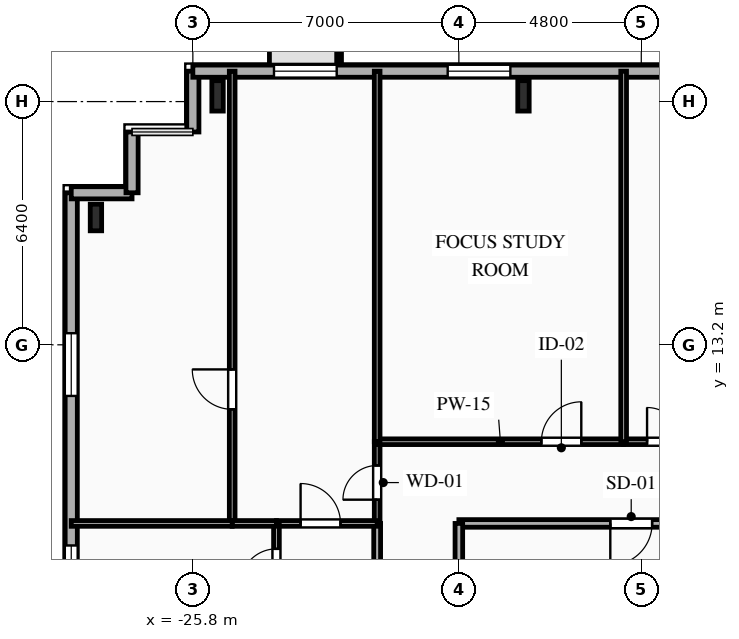
"""IFC4 building model, lengths in metres.
Left out: names, types, materials, properties, quantities, classifications, styles, units other than length and angle.
Written with IfcOpenShell. Run it as: python <this file> out.ifc"""

import sys

from ifc_helpers import new_model, si_unit, direction, frame, frame_2d, origin, origin_2d, place, context, subcontext, project, spatial, rectangle, i_section, extrude, element, fill, save


model = new_model("IFC4")
c1 = context("Model", 3, precision=1e-05, world=origin(), true_north=direction((0.0, 1.0)))
c2 = subcontext(c1, "Body", "Model", "MODEL_VIEW")
j1 = project(units=[si_unit("LENGTHUNIT", "METRE"), si_unit("PLANEANGLEUNIT", "RADIAN")], contexts=[c1])
p1 = place(None, origin())
s1 = spatial("IfcSite", under=j1, at=p1, CompositionType="ELEMENT")
p2 = place(p1, origin())
s2 = spatial("IfcBuilding", under=s1, at=p2, CompositionType="ELEMENT")
p3 = place(p2, frame((0.0, 0.0, 141.05)))
s3 = spatial("IfcBuildingStorey", under=s2, at=p3, CompositionType="ELEMENT", Elevation=141.05)
for number, where, z_axis, x_axis in (
    (1, (-17.1, 19.75, 0.0), (0.0, 0.0, 1.0), (1.0, 0.0, 0.0)),
    (2, (-25.15, 19.75, 0.0), (0.0, 0.0, 1.0), (1.0, 0.0, 0.0)),
):
    element("IfcColumn", number, at=place(p3, frame(where, z_axis=z_axis, x_axis=x_axis)), inside=s3, PredefinedType="COLUMN", context=c2, shape_type="SweptSolid", body=[
        extrude(i_section(OverallWidth=0.3, OverallDepth=0.8, WebThickness=0.018, FlangeThickness=0.033, FilletRadius=0.03, at=origin_2d()), origin(), (0.0, 0.0, 1.0), 3.35),
    ])
p4 = place(p3, frame((-28.35, 16.55, 0.0), z_axis=(0.0, 0.0, 1.0), x_axis=(1.0, 0.0, 0.0)))
e3 = element("IfcColumn", 3, at=p4, inside=s3, PredefinedType="COLUMN", context=c2, shape_type="SweptSolid", body=[
    extrude(i_section(OverallWidth=0.3, OverallDepth=0.7, WebThickness=0.017, FlangeThickness=0.032, FilletRadius=0.027, at=origin_2d()), origin(), (0.0, 0.0, 1.0), 3.35),
])
p5 = place(p3, frame((-29.0, -12.4, 0.0), z_axis=(0.0, 0.0, 1.0), x_axis=(0.0, 1.0, 0.0)))
e4 = element("IfcWall", 4, at=p5, inside=s3, PredefinedType="SOLIDWALL", context=c2, shape_type="SweptSolid", body=[
    extrude(rectangle(XDim=29.6, YDim=0.32, at=frame_2d((14.8, 0.0))), origin(), (0.0, 0.0, 1.0), 3.04),
])
p6 = place(p5, frame((2.855, 0.0, 0.85)))
e5 = element("IfcOpeningElement", 5, at=p6, cuts=e4, PredefinedType="OPENING", context=c2, shape_type="SweptSolid", body=[
    extrude(rectangle(XDim=1.65, YDim=1.85, at=frame_2d((0.825, 0.925))), frame((0.0, 0.17, 0.0), z_axis=(0.0, -1.0, 0.0), x_axis=(1.0, 0.0, 0.0)), (0.0, 0.0, 1.0), 0.34),
])
p7 = place(p5, frame((9.865, 0.0, 0.85)))
e6 = element("IfcOpeningElement", 6, at=p7, cuts=e4, PredefinedType="OPENING", context=c2, shape_type="SweptSolid", body=[
    extrude(rectangle(XDim=1.95, YDim=1.85, at=frame_2d((0.975, 0.925))), frame((0.0, 0.17, 0.0), z_axis=(0.0, -1.0, 0.0), x_axis=(1.0, 0.0, 0.0)), (0.0, 0.0, 1.0), 0.34),
])
p8 = place(p5, frame((13.08, 0.0, 0.85)))
e7 = element("IfcOpeningElement", 7, at=p8, cuts=e4, PredefinedType="OPENING", context=c2, shape_type="SweptSolid", body=[
    extrude(rectangle(XDim=1.6, YDim=1.85, at=frame_2d((0.8, 0.925))), frame((0.0, 0.17, 0.0), z_axis=(0.0, -1.0, 0.0), x_axis=(1.0, 0.0, 0.0)), (0.0, 0.0, 1.0), 0.34),
])
p9 = place(p5, frame((15.88, 0.0, 0.85)))
e8 = element("IfcOpeningElement", 8, at=p9, cuts=e4, PredefinedType="OPENING", context=c2, shape_type="SweptSolid", body=[
    extrude(rectangle(XDim=1.6, YDim=1.85, at=frame_2d((0.8, 0.925))), frame((0.0, 0.17, 0.0), z_axis=(0.0, -1.0, 0.0), x_axis=(1.0, 0.0, 0.0)), (0.0, 0.0, 1.0), 0.34),
])
p10 = place(p5, frame((18.72, 0.0, 0.85)))
e9 = element("IfcOpeningElement", 9, at=p10, cuts=e4, PredefinedType="OPENING", context=c2, shape_type="SweptSolid", body=[
    extrude(rectangle(XDim=1.6, YDim=1.85, at=frame_2d((0.8, 0.925))), frame((0.0, 0.17, 0.0), z_axis=(0.0, -1.0, 0.0), x_axis=(1.0, 0.0, 0.0)), (0.0, 0.0, 1.0), 0.34),
])
p11 = place(p5, frame((24.255, 0.0, 0.85)))
e10 = element("IfcOpeningElement", 10, at=p11, cuts=e4, PredefinedType="OPENING", context=c2, shape_type="SweptSolid", body=[
    extrude(rectangle(XDim=1.65, YDim=1.85, at=frame_2d((0.825, 0.925))), frame((0.0, 0.17, 0.0), z_axis=(0.0, -1.0, 0.0), x_axis=(1.0, 0.0, 0.0)), (0.0, 0.0, 1.0), 0.34),
])
for number, where, z_axis, x_axis in (
    (11, (-29.0, 17.2, 0.0), (0.0, 0.0, 1.0), (1.0, 0.0, 0.0)),
    (12, (-27.4, 17.2, 0.0), (0.0, 0.0, 1.0), (0.0, 1.0, 0.0)),
):
    element("IfcWall", number, at=place(p3, frame(where, z_axis=z_axis, x_axis=x_axis)), inside=s3, PredefinedType="SOLIDWALL", context=c2, shape_type="SweptSolid", body=[
        extrude(rectangle(XDim=1.6, YDim=0.32, at=frame_2d((0.8, 0.0))), origin(), (0.0, 0.0, 1.0), 3.04),
    ])
p12 = place(p3, frame((-25.8, 18.8, 0.0), z_axis=(0.0, 0.0, 1.0), x_axis=(0.0, 1.0, 0.0)))
e13 = element("IfcWall", 13, at=p12, inside=s3, PredefinedType="SOLIDWALL", context=c2, shape_type="SweptSolid", body=[
    extrude(rectangle(XDim=1.6, YDim=0.32, at=frame_2d((0.8, 0.0))), origin(), (0.0, 0.0, 1.0), 3.04),
])
p13 = place(p3, frame((-25.8, 20.4, 0.0), z_axis=(0.0, 0.0, 1.0), x_axis=(1.0, 0.0, 0.0)))
e14 = element("IfcWall", 14, at=p13, inside=s3, PredefinedType="SOLIDWALL", context=c2, shape_type="SweptSolid", body=[
    extrude(rectangle(XDim=49.6, YDim=0.32, at=frame_2d((24.8, 0.0))), origin(), (0.0, 0.0, 1.0), 3.04),
])
p14 = place(p13, frame((2.135, 0.0, 0.85)))
e15 = element("IfcOpeningElement", 15, at=p14, cuts=e14, PredefinedType="OPENING", context=c2, shape_type="SweptSolid", body=[
    extrude(rectangle(XDim=1.65, YDim=1.85, at=frame_2d((0.825, 0.925))), frame((0.0, 0.17, 0.0), z_axis=(0.0, -1.0, 0.0), x_axis=(1.0, 0.0, 0.0)), (0.0, 0.0, 1.0), 0.34),
])
p15 = place(p13, frame((6.706, 0.0, 0.85)))
e16 = element("IfcOpeningElement", 16, at=p15, cuts=e14, PredefinedType="OPENING", context=c2, shape_type="SweptSolid", body=[
    extrude(rectangle(XDim=1.65, YDim=1.85, at=frame_2d((0.825, 0.925))), frame((0.0, 0.17, 0.0), z_axis=(0.0, -1.0, 0.0), x_axis=(1.0, 0.0, 0.0)), (0.0, 0.0, 1.0), 0.34),
])
p16 = place(p13, frame((14.76, 0.0, 0.85)))
e17 = element("IfcOpeningElement", 17, at=p16, cuts=e14, PredefinedType="OPENING", context=c2, shape_type="SweptSolid", body=[
    extrude(rectangle(XDim=1.6, YDim=1.85, at=frame_2d((0.8, 0.925))), frame((0.0, 0.17, 0.0), z_axis=(0.0, -1.0, 0.0), x_axis=(1.0, 0.0, 0.0)), (0.0, 0.0, 1.0), 0.34),
])
p17 = place(p13, frame((19.26, 0.0, 0.85)))
e18 = element("IfcOpeningElement", 18, at=p17, cuts=e14, PredefinedType="OPENING", context=c2, shape_type="SweptSolid", body=[
    extrude(rectangle(XDim=2.2, YDim=1.85, at=frame_2d((1.1, 0.925))), frame((0.0, 0.17, 0.0), z_axis=(0.0, -1.0, 0.0), x_axis=(1.0, 0.0, 0.0)), (0.0, 0.0, 1.0), 0.34),
])
p18 = place(p13, frame((25.26, 0.0, 0.85)))
e19 = element("IfcOpeningElement", 19, at=p18, cuts=e14, PredefinedType="OPENING", context=c2, shape_type="SweptSolid", body=[
    extrude(rectangle(XDim=2.2, YDim=1.85, at=frame_2d((1.1, 0.925))), frame((0.0, 0.17, 0.0), z_axis=(0.0, -1.0, 0.0), x_axis=(1.0, 0.0, 0.0)), (0.0, 0.0, 1.0), 0.34),
])
p19 = place(p13, frame((30.4, 0.0, 0.85)))
e20 = element("IfcOpeningElement", 20, at=p19, cuts=e14, PredefinedType="OPENING", context=c2, shape_type="SweptSolid", body=[
    extrude(rectangle(XDim=2.2, YDim=1.85, at=frame_2d((1.1, 0.925))), frame((0.0, 0.17, 0.0), z_axis=(0.0, -1.0, 0.0), x_axis=(1.0, 0.0, 0.0)), (0.0, 0.0, 1.0), 0.34),
])
p20 = place(p13, frame((37.18, 0.0, 0.85)))
e21 = element("IfcOpeningElement", 21, at=p20, cuts=e14, PredefinedType="OPENING", context=c2, shape_type="SweptSolid", body=[
    extrude(rectangle(XDim=2.2, YDim=1.85, at=frame_2d((1.1, 0.925))), frame((0.0, 0.17, 0.0), z_axis=(0.0, -1.0, 0.0), x_axis=(1.0, 0.0, 0.0)), (0.0, 0.0, 1.0), 0.34),
])
p21 = place(p13, frame((43.215, 0.0, 0.85)))
e22 = element("IfcOpeningElement", 22, at=p21, cuts=e14, PredefinedType="OPENING", context=c2, shape_type="SweptSolid", body=[
    extrude(rectangle(XDim=1.65, YDim=1.85, at=frame_2d((0.825, 0.925))), frame((0.0, 0.17, 0.0), z_axis=(0.0, -1.0, 0.0), x_axis=(1.0, 0.0, 0.0)), (0.0, 0.0, 1.0), 0.34),
])
p22 = place(p13, frame((47.45, 0.0, 0.85)))
e23 = element("IfcOpeningElement", 23, at=p22, cuts=e14, PredefinedType="OPENING", context=c2, shape_type="SweptSolid", body=[
    extrude(rectangle(XDim=1.1, YDim=1.85, at=frame_2d((0.55, 0.925))), frame((0.0, 0.17, 0.0), z_axis=(0.0, -1.0, 0.0), x_axis=(1.0, 0.0, 0.0)), (0.0, 0.0, 1.0), 0.34),
])
p23 = place(p3, frame((-12.0, 8.5, 0.0), z_axis=(0.0, 0.0, 1.0), x_axis=(-1.0, 0.0, 0.0)))
e24 = element("IfcWall", 24, at=p23, inside=s3, PredefinedType="PARTITIONING", context=c2, shape_type="SweptSolid", body=[
    extrude(rectangle(XDim=6.8, YDim=0.2, at=frame_2d((3.4, 0.0))), origin(), (0.0, 0.0, 1.0), 3.04),
])
p24 = place(p23, frame((1.715, 0.0, 0.0)))
e25 = element("IfcOpeningElement", 25, at=p24, cuts=e24, PredefinedType="OPENING", context=c2, shape_type="SweptSolid", body=[
    extrude(rectangle(XDim=1.1, YDim=2.15, at=frame_2d((0.55, 1.075))), frame((0.0, 0.11, 0.0), z_axis=(0.0, -1.0, 0.0), x_axis=(1.0, 0.0, 0.0)), (0.0, 0.0, 1.0), 0.22),
])
p25 = place(p3, frame((-18.8, 8.5, 0.0), z_axis=(0.0, 0.0, 1.0), x_axis=(0.0, -1.0, 0.0)))
e26 = element("IfcWall", 26, at=p25, inside=s3, PredefinedType="PARTITIONING", context=c2, shape_type="SweptSolid", body=[
    extrude(rectangle(XDim=2.9, YDim=0.2, at=frame_2d((1.45, 0.0))), origin(), (0.0, 0.0, 1.0), 2.525),
])
p26 = place(p3, frame((-20.95, 8.5, 0.0), z_axis=(0.0, 0.0, 1.0), x_axis=(0.0, 1.0, 0.0)))
e27 = element("IfcWall", 27, at=p26, inside=s3, PredefinedType="PARTITIONING", context=c2, shape_type="SweptSolid", body=[
    extrude(rectangle(XDim=2.15, YDim=0.15, at=frame_2d((1.075, 0.0))), origin(), (0.0, 0.0, 1.0), 3.04),
])
p27 = place(p26, frame((0.625, 0.0, 0.0)))
e28 = element("IfcOpeningElement", 28, at=p27, cuts=e27, PredefinedType="OPENING", context=c2, shape_type="SweptSolid", body=[
    extrude(rectangle(XDim=0.9, YDim=2.1, at=frame_2d((0.45, 1.05))), frame((0.0, 0.085, 0.0), z_axis=(0.0, -1.0, 0.0), x_axis=(1.0, 0.0, 0.0)), (0.0, 0.0, 1.0), 0.17),
])
p28 = place(p3, frame((-20.95, 10.65, 0.0), z_axis=(0.0, 0.0, 1.0), x_axis=(1.0, 0.0, 0.0)))
e29 = element("IfcWall", 29, at=p28, inside=s3, PredefinedType="PARTITIONING", context=c2, shape_type="SweptSolid", body=[
    extrude(rectangle(XDim=6.486, YDim=0.15, at=frame_2d((3.243, 0.0))), origin(), (0.0, 0.0, 1.0), 3.04),
])
p29 = place(p28, frame((4.322, 0.0, 0.0)))
e30 = element("IfcOpeningElement", 30, at=p29, cuts=e29, PredefinedType="OPENING", context=c2, shape_type="SweptSolid", body=[
    extrude(rectangle(XDim=1.05, YDim=2.15, at=frame_2d((0.525, 1.075))), frame((0.0, 0.085, 0.0), z_axis=(0.0, -1.0, 0.0), x_axis=(1.0, 0.0, 0.0)), (0.0, 0.0, 1.0), 0.17),
])
p30 = place(p3, frame((-14.464, 10.65, 0.0), z_axis=(0.0, 0.0, 1.0), x_axis=(1.0, 0.0, 0.0)))
e31 = element("IfcWall", 31, at=p30, inside=s3, PredefinedType="PLUMBINGWALL", context=c2, shape_type="SweptSolid", body=[
    extrude(rectangle(XDim=2.35, YDim=0.15, at=frame_2d((1.175, 0.0))), origin(), (0.0, 0.0, 1.0), 3.04),
])
p31 = place(p30, frame((0.616, 0.0, 0.0)))
e32 = element("IfcOpeningElement", 32, at=p31, cuts=e31, PredefinedType="OPENING", context=c2, shape_type="SweptSolid", body=[
    extrude(rectangle(XDim=0.9, YDim=2.1, at=frame_2d((0.45, 1.05))), frame((0.0, 0.085, 0.0), z_axis=(0.0, -1.0, 0.0), x_axis=(1.0, 0.0, 0.0)), (0.0, 0.0, 1.0), 0.17),
])
p32 = place(p3, frame((-20.95, -5.6, 0.0), z_axis=(0.0, 0.0, 1.0), x_axis=(0.0, 1.0, 0.0)))
e33 = element("IfcWall", 33, at=p32, inside=s3, PredefinedType="PARTITIONING", context=c2, shape_type="SweptSolid", body=[
    extrude(rectangle(XDim=14.1, YDim=0.18, at=frame_2d((7.05, 0.0))), origin(), (0.0, 0.0, 1.0), 3.04),
])
p33 = place(p32, frame((5.058, 0.0, 0.0)))
e34 = element("IfcOpeningElement", 34, at=p33, cuts=e33, PredefinedType="OPENING", context=c2, shape_type="SweptSolid", body=[
    extrude(rectangle(XDim=1.0, YDim=2.15, at=frame_2d((0.5, 1.075))), frame((0.0, 0.1, 0.0), z_axis=(0.0, -1.0, 0.0), x_axis=(1.0, 0.0, 0.0)), (0.0, 0.0, 1.0), 0.2),
])
p34 = place(p3, frame((-23.6, 8.5, 0.0), z_axis=(0.0, 0.0, 1.0), x_axis=(1.0, 0.0, 0.0)))
e35 = element("IfcWall", 35, at=p34, inside=s3, PredefinedType="PARTITIONING", context=c2, shape_type="SweptSolid", body=[
    extrude(rectangle(XDim=2.65, YDim=0.15, at=frame_2d((1.325, 0.0))), origin(), (0.0, 0.0, 1.0), 3.04),
])
p35 = place(p34, frame((0.635, 0.0, 0.0)))
e36 = element("IfcOpeningElement", 36, at=p35, cuts=e35, PredefinedType="OPENING", context=c2, shape_type="SweptSolid", body=[
    extrude(rectangle(XDim=1.05, YDim=2.15, at=frame_2d((0.525, 1.075))), frame((0.0, 0.085, 0.0), z_axis=(0.0, -1.0, 0.0), x_axis=(1.0, 0.0, 0.0)), (0.0, 0.0, 1.0), 0.17),
])
p36 = place(p3, frame((-23.6, 5.68, 0.0), z_axis=(0.0, 0.0, 1.0), x_axis=(0.0, 1.0, 0.0)))
e37 = element("IfcWall", 37, at=p36, inside=s3, PredefinedType="PARTITIONING", context=c2, shape_type="SweptSolid", body=[
    extrude(rectangle(XDim=2.82, YDim=0.15, at=frame_2d((1.41, 0.0))), origin(), (0.0, 0.0, 1.0), 2.695),
])
p37 = place(p36, frame((1.201, 0.0, 0.0)))
e38 = element("IfcOpeningElement", 38, at=p37, cuts=e37, PredefinedType="OPENING", context=c2, shape_type="SweptSolid", body=[
    extrude(rectangle(XDim=0.95, YDim=2.1, at=frame_2d((0.475, 1.05))), frame((0.0, 0.085, 0.0), z_axis=(0.0, -1.0, 0.0), x_axis=(1.0, 0.0, 0.0)), (0.0, 0.0, 1.0), 0.17),
])
p38 = place(p3, frame((-24.765, 8.5, 0.0), z_axis=(0.0, 0.0, 1.0), x_axis=(0.0, 1.0, 0.0)))
e39 = element("IfcWall", 39, at=p38, inside=s3, PredefinedType="PARTITIONING", context=c2, shape_type="SweptSolid", body=[
    extrude(rectangle(XDim=11.9, YDim=0.15, at=frame_2d((5.95, 0.0))), origin(), (0.0, 0.0, 1.0), 3.04),
])
p39 = place(p38, frame((3.002, 0.0, 0.0)))
e40 = element("IfcOpeningElement", 40, at=p39, cuts=e39, PredefinedType="OPENING", context=c2, shape_type="SweptSolid", body=[
    extrude(rectangle(XDim=1.05, YDim=2.15, at=frame_2d((0.525, 1.075))), frame((0.0, 0.085, 0.0), z_axis=(0.0, -1.0, 0.0), x_axis=(1.0, 0.0, 0.0)), (0.0, 0.0, 1.0), 0.17),
])
p40 = place(p3, frame((-23.6, 8.5, 0.0), z_axis=(0.0, 0.0, 1.0), x_axis=(-1.0, 0.0, 0.0)))
e41 = element("IfcWall", 41, at=p40, inside=s3, PredefinedType="PARTITIONING", context=c2, shape_type="SweptSolid", body=[
    extrude(rectangle(XDim=1.165, YDim=0.15, at=frame_2d((0.583, 0.0))), origin(), (0.0, 0.0, 1.0), 3.04),
])
p41 = place(p3, frame((-20.95, 20.4, 0.0), z_axis=(0.0, 0.0, 1.0), x_axis=(0.0, -1.0, 0.0)))
e42 = element("IfcWall", 42, at=p41, inside=s3, PredefinedType="PARTITIONING", context=c2, shape_type="SweptSolid", body=[
    extrude(rectangle(XDim=9.75, YDim=0.15, at=frame_2d((4.875, 0.0))), origin(), (0.0, 0.0, 1.0), 3.04),
])
p42 = place(p3, frame((-24.765, 8.5, 0.0), z_axis=(0.0, 0.0, 1.0), x_axis=(-1.0, 0.0, 0.0)))
e43 = element("IfcWall", 43, at=p42, inside=s3, PredefinedType="PARTITIONING", context=c2, shape_type="SweptSolid", body=[
    extrude(rectangle(XDim=4.235, YDim=0.15, at=frame_2d((2.118, 0.0))), origin(), (0.0, 0.0, 1.0), 3.04),
])
p43 = place(p3, frame((-14.464, 20.4, 0.0), z_axis=(0.0, 0.0, 1.0), x_axis=(0.0, -1.0, 0.0)))
e44 = element("IfcWall", 44, at=p43, inside=s3, PredefinedType="PLUMBINGWALL", context=c2, shape_type="SweptSolid", body=[
    extrude(rectangle(XDim=9.75, YDim=0.15, at=frame_2d((4.875, 0.0))), origin(), (0.0, 0.0, 1.0), 3.04),
])
p44 = place(p10, origin())
e45 = element("IfcWindow", 45, at=p44, inside=s3, PartitioningType="SINGLE_PANEL", PredefinedType="WINDOW", context=c2, shape_type="SweptSolid", body=[
    extrude(rectangle(XDim=1.6, YDim=1.85, at=frame_2d((0.8, 0.925))), frame((0.0, 0.03, 0.0), z_axis=(0.0, -1.0, 0.0), x_axis=(1.0, 0.0, 0.0)), (0.0, 0.0, 1.0), 0.06),
])
fill(e9, e45)
p45 = place(p11, origin())
e46 = element("IfcWindow", 46, at=p45, inside=s3, PartitioningType="SINGLE_PANEL", PredefinedType="WINDOW", context=c2, shape_type="SweptSolid", body=[
    extrude(rectangle(XDim=1.65, YDim=1.85, at=frame_2d((0.825, 0.925))), frame((0.0, 0.03, 0.0), z_axis=(0.0, -1.0, 0.0), x_axis=(1.0, 0.0, 0.0)), (0.0, 0.0, 1.0), 0.06),
])
fill(e10, e46)
p46 = place(p14, origin())
e47 = element("IfcWindow", 47, at=p46, inside=s3, PartitioningType="SINGLE_PANEL", PredefinedType="WINDOW", context=c2, shape_type="SweptSolid", body=[
    extrude(rectangle(XDim=1.65, YDim=1.85, at=frame_2d((0.825, 0.925))), frame((0.0, 0.03, 0.0), z_axis=(0.0, -1.0, 0.0), x_axis=(1.0, 0.0, 0.0)), (0.0, 0.0, 1.0), 0.06),
])
fill(e15, e47)
p47 = place(p15, origin())
e48 = element("IfcWindow", 48, at=p47, inside=s3, PartitioningType="SINGLE_PANEL", PredefinedType="WINDOW", context=c2, shape_type="SweptSolid", body=[
    extrude(rectangle(XDim=1.65, YDim=1.85, at=frame_2d((0.825, 0.925))), frame((0.0, 0.03, 0.0), z_axis=(0.0, -1.0, 0.0), x_axis=(1.0, 0.0, 0.0)), (0.0, 0.0, 1.0), 0.06),
])
fill(e16, e48)
p48 = place(p24, origin())
e49 = element("IfcDoor", 49, at=p48, inside=s3, OperationType="SINGLE_SWING_RIGHT", PredefinedType="DOOR", context=c2, shape_type="SweptSolid", body=[
    extrude(rectangle(XDim=1.1, YDim=2.15, at=frame_2d((0.55, 1.075))), frame((0.0, 0.025, 0.0), z_axis=(0.0, -1.0, 0.0), x_axis=(1.0, 0.0, 0.0)), (0.0, 0.0, 1.0), 0.05),
])
fill(e25, e49)
p49 = place(p27, origin())
e50 = element("IfcDoor", 50, at=p49, inside=s3, OperationType="SINGLE_SWING_LEFT", PredefinedType="DOOR", context=c2, shape_type="SweptSolid", body=[
    extrude(rectangle(XDim=0.9, YDim=2.1, at=frame_2d((0.45, 1.05))), frame((0.0, 0.025, 0.0), z_axis=(0.0, -1.0, 0.0), x_axis=(1.0, 0.0, 0.0)), (0.0, 0.0, 1.0), 0.05),
])
fill(e28, e50)
p50 = place(p29, origin())
e51 = element("IfcDoor", 51, at=p50, inside=s3, OperationType="SINGLE_SWING_RIGHT", PredefinedType="DOOR", context=c2, shape_type="SweptSolid", body=[
    extrude(rectangle(XDim=1.05, YDim=2.15, at=frame_2d((0.525, 1.075))), frame((0.0, 0.025, 0.0), z_axis=(0.0, -1.0, 0.0), x_axis=(1.0, 0.0, 0.0)), (0.0, 0.0, 1.0), 0.05),
])
fill(e30, e51)
p51 = place(p31, origin())
e52 = element("IfcDoor", 52, at=p51, inside=s3, OperationType="SINGLE_SWING_LEFT", PredefinedType="DOOR", context=c2, shape_type="SweptSolid", body=[
    extrude(rectangle(XDim=0.9, YDim=2.1, at=frame_2d((0.45, 1.05))), frame((0.0, 0.025, 0.0), z_axis=(0.0, -1.0, 0.0), x_axis=(1.0, 0.0, 0.0)), (0.0, 0.0, 1.0), 0.05),
])
fill(e32, e52)
p52 = place(p35, origin())
e53 = element("IfcDoor", 53, at=p52, inside=s3, OperationType="SINGLE_SWING_LEFT", PredefinedType="DOOR", context=c2, shape_type="SweptSolid", body=[
    extrude(rectangle(XDim=1.05, YDim=2.15, at=frame_2d((0.525, 1.075))), frame((0.0, 0.025, 0.0), z_axis=(0.0, -1.0, 0.0), x_axis=(1.0, 0.0, 0.0)), (0.0, 0.0, 1.0), 0.05),
])
fill(e36, e53)
p53 = place(p37, origin())
e54 = element("IfcDoor", 54, at=p53, inside=s3, OperationType="SINGLE_SWING_LEFT", PredefinedType="DOOR", context=c2, shape_type="SweptSolid", body=[
    extrude(rectangle(XDim=0.95, YDim=2.1, at=frame_2d((0.475, 1.05))), frame((0.0, 0.025, 0.0), z_axis=(0.0, -1.0, 0.0), x_axis=(1.0, 0.0, 0.0)), (0.0, 0.0, 1.0), 0.05),
])
fill(e38, e54)
p54 = place(p39, origin())
e55 = element("IfcDoor", 55, at=p54, inside=s3, OperationType="SINGLE_SWING_RIGHT", PredefinedType="DOOR", context=c2, shape_type="SweptSolid", body=[
    extrude(rectangle(XDim=1.05, YDim=2.15, at=frame_2d((0.525, 1.075))), frame((0.0, 0.025, 0.0), z_axis=(0.0, -1.0, 0.0), x_axis=(1.0, 0.0, 0.0)), (0.0, 0.0, 1.0), 0.05),
])
fill(e40, e55)
save(model, sys.argv[1])
